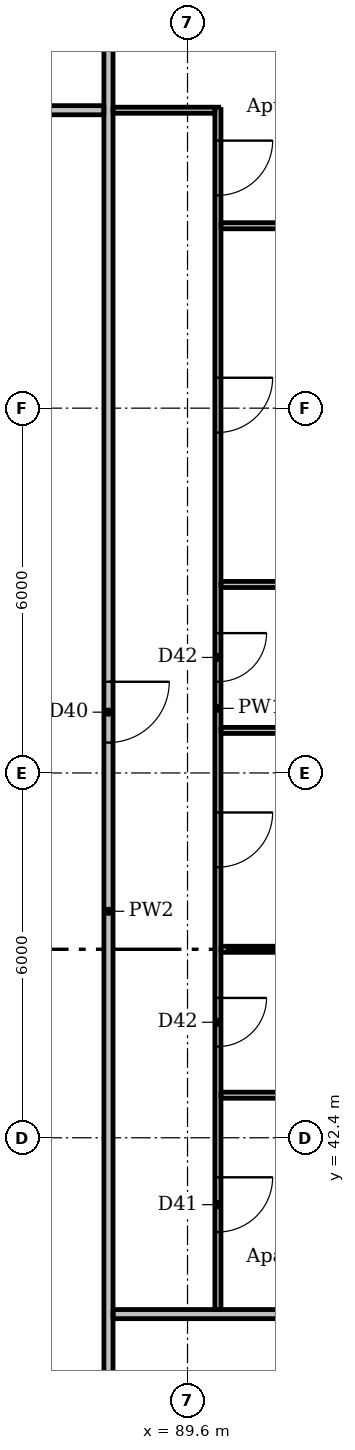
"""IFC4 building model, lengths in metres.
Left out: names, types, materials, properties, quantities, classifications, styles, units other than length and angle.
Written with IfcOpenShell. Run it as: python <this file> out.ifc"""

import sys

from ifc_helpers import new_model, si_unit, direction, frame, frame_2d, origin, place, context, subcontext, project, spatial, rectangle, extrude, element, fill, save


model = new_model("IFC4")
c1 = context("Model", 3, precision=1e-05, world=origin(), true_north=direction((0.0, 1.0)))
c2 = subcontext(c1, "Body", "Model", "MODEL_VIEW")
j1 = project(units=[si_unit("LENGTHUNIT", "METRE"), si_unit("PLANEANGLEUNIT", "RADIAN")], contexts=[c1])
p1 = place(None, origin())
s1 = spatial("IfcSite", under=j1, at=p1, CompositionType="ELEMENT")
p2 = place(p1, origin())
s2 = spatial("IfcBuilding", under=s1, at=p2, CompositionType="ELEMENT")
p3 = place(p2, frame((0.0, 0.0, 46.6)))
s3 = spatial("IfcBuildingStorey", under=s2, at=p3, CompositionType="ELEMENT", Elevation=46.6)
p4 = place(p3, frame((90.1, 59.35, 0.0), z_axis=(0.0, 0.0, 1.0), x_axis=(0.0, -1.0, 0.0)))
e1 = element("IfcWall", 1, at=p4, inside=s3, PredefinedType="PARTITIONING", context=c2, shape_type="SweptSolid", body=[
    extrude(rectangle(XDim=19.775, YDim=0.1, at=frame_2d((9.888, 0.0))), origin(), (0.0, 0.0, 1.0), 3.05),
])
p5 = place(p4, frame((4.45, 0.0, 0.0)))
e2 = element("IfcOpeningElement", 2, at=p5, cuts=e1, PredefinedType="OPENING", context=c2, shape_type="SweptSolid", body=[
    extrude(rectangle(XDim=0.9, YDim=2.1, at=frame_2d((0.45, 1.05))), frame((0.0, 0.06, 0.0), z_axis=(0.0, -1.0, 0.0), x_axis=(1.0, 0.0, 0.0)), (0.0, 0.0, 1.0), 0.12),
])
p6 = place(p4, frame((0.55, 0.0, 0.0)))
e3 = element("IfcOpeningElement", 3, at=p6, cuts=e1, PredefinedType="OPENING", context=c2, shape_type="SweptSolid", body=[
    extrude(rectangle(XDim=0.9, YDim=2.1, at=frame_2d((0.45, 1.05))), frame((0.0, 0.06, 0.0), z_axis=(0.0, -1.0, 0.0), x_axis=(1.0, 0.0, 0.0)), (0.0, 0.0, 1.0), 0.12),
])
p7 = place(p4, frame((17.6, 0.0, 0.0)))
e4 = element("IfcOpeningElement", 4, at=p7, cuts=e1, PredefinedType="OPENING", context=c2, shape_type="SweptSolid", body=[
    extrude(rectangle(XDim=0.9, YDim=2.1, at=frame_2d((0.45, 1.05))), frame((0.0, 0.06, 0.0), z_axis=(0.0, -1.0, 0.0), x_axis=(1.0, 0.0, 0.0)), (0.0, 0.0, 1.0), 0.12),
])
p8 = place(p4, frame((11.6, 0.0, 0.0)))
e5 = element("IfcOpeningElement", 5, at=p8, cuts=e1, PredefinedType="OPENING", context=c2, shape_type="SweptSolid", body=[
    extrude(rectangle(XDim=0.9, YDim=2.1, at=frame_2d((0.45, 1.05))), frame((0.0, 0.06, 0.0), z_axis=(0.0, -1.0, 0.0), x_axis=(1.0, 0.0, 0.0)), (0.0, 0.0, 1.0), 0.12),
])
p9 = place(p4, frame((14.65, 0.0, 0.0)))
e6 = element("IfcOpeningElement", 6, at=p9, cuts=e1, PredefinedType="OPENING", context=c2, shape_type="SweptSolid", body=[
    extrude(rectangle(XDim=0.8, YDim=2.1, at=frame_2d((0.4, 1.05))), frame((0.0, 0.06, 0.0), z_axis=(0.0, -1.0, 0.0), x_axis=(1.0, 0.0, 0.0)), (0.0, 0.0, 1.0), 0.12),
])
p10 = place(p4, frame((8.65, 0.0, 0.0)))
e7 = element("IfcOpeningElement", 7, at=p10, cuts=e1, PredefinedType="OPENING", context=c2, shape_type="SweptSolid", body=[
    extrude(rectangle(XDim=0.8, YDim=2.1, at=frame_2d((0.4, 1.05))), frame((0.0, 0.06, 0.0), z_axis=(0.0, -1.0, 0.0), x_axis=(1.0, 0.0, 0.0)), (0.0, 0.0, 1.0), 0.12),
])
p11 = place(p3, frame((88.375, 59.3, 0.0), z_axis=(0.0, 0.0, 1.0), x_axis=(1.0, 0.0, 0.0)))
e8 = element("IfcWall", 8, at=p11, inside=s3, PredefinedType="PARTITIONING", context=c2, shape_type="SweptSolid", body=[
    extrude(rectangle(XDim=1.675, YDim=0.1, at=frame_2d((0.837, 0.0))), origin(), (0.0, 0.0, 1.0), 3.05),
])
p12 = place(p3, frame((90.15, 57.4, 0.0), z_axis=(0.0, 0.0, 1.0), x_axis=(1.0, 0.0, 0.0)))
e9 = element("IfcWall", 9, at=p12, inside=s3, PredefinedType="PARTITIONING", context=c2, shape_type="SweptSolid", body=[
    extrude(rectangle(XDim=2.7, YDim=0.1, at=frame_2d((1.35, 0.0))), origin(), (0.0, 0.0, 1.0), 3.05),
])
p13 = place(p3, frame((90.15, 51.5, 0.0), z_axis=(0.0, 0.0, 1.0), x_axis=(1.0, 0.0, 0.0)))
e10 = element("IfcWall", 10, at=p13, inside=s3, PredefinedType="PARTITIONING", context=c2, shape_type="SweptSolid", body=[
    extrude(rectangle(XDim=8.35, YDim=0.1, at=frame_2d((4.175, 0.0))), origin(), (0.0, 0.0, 1.0), 3.05),
])
p14 = place(p3, frame((90.15, 49.1, 0.0), z_axis=(0.0, 0.0, 1.0), x_axis=(1.0, 0.0, 0.0)))
e11 = element("IfcWall", 11, at=p14, inside=s3, PredefinedType="PARTITIONING", context=c2, shape_type="SweptSolid", body=[
    extrude(rectangle(XDim=2.7, YDim=0.1, at=frame_2d((1.35, 0.0))), origin(), (0.0, 0.0, 1.0), 3.05),
])
p15 = place(p3, frame((90.15, 45.5, 0.0), z_axis=(0.0, 0.0, 1.0), x_axis=(1.0, 0.0, 0.0)))
e12 = element("IfcWall", 12, at=p15, inside=s3, PredefinedType="PARTITIONING", context=c2, shape_type="SweptSolid", body=[
    extrude(rectangle(XDim=8.35, YDim=0.1, at=frame_2d((4.175, 0.0))), origin(), (0.0, 0.0, 1.0), 3.05),
])
p16 = place(p3, frame((90.15, 43.1, 0.0), z_axis=(0.0, 0.0, 1.0), x_axis=(1.0, 0.0, 0.0)))
e13 = element("IfcWall", 13, at=p16, inside=s3, PredefinedType="PARTITIONING", context=c2, shape_type="SweptSolid", body=[
    extrude(rectangle(XDim=2.7, YDim=0.1, at=frame_2d((1.35, 0.0))), origin(), (0.0, 0.0, 1.0), 3.05),
])
p17 = place(p3, frame((88.3, 60.475, 0.0), z_axis=(0.0, 0.0, 1.0), x_axis=(0.0, -1.0, 0.0)))
e14 = element("IfcWall", 14, at=p17, inside=s3, PredefinedType="PARTITIONING", context=c2, shape_type="SweptSolid", body=[
    extrude(rectangle(XDim=28.7, YDim=0.15, at=frame_2d((14.35, 0.0))), origin(), (0.0, 0.0, 1.0), 3.05),
])
p18 = place(p17, frame((27.425, 0.0, 0.0)))
e15 = element("IfcOpeningElement", 15, at=p18, cuts=e14, PredefinedType="OPENING", context=c2, shape_type="SweptSolid", body=[
    extrude(rectangle(XDim=1.0, YDim=2.1, at=frame_2d((0.5, 1.05))), frame((0.0, 0.085, 0.0), z_axis=(0.0, -1.0, 0.0), x_axis=(1.0, 0.0, 0.0)), (0.0, 0.0, 1.0), 0.17),
])
p19 = place(p17, frame((10.575, 0.0, 0.0)))
e16 = element("IfcOpeningElement", 16, at=p19, cuts=e14, PredefinedType="OPENING", context=c2, shape_type="SweptSolid", body=[
    extrude(rectangle(XDim=1.0, YDim=2.1, at=frame_2d((0.5, 1.05))), frame((0.0, 0.085, 0.0), z_axis=(0.0, -1.0, 0.0), x_axis=(1.0, 0.0, 0.0)), (0.0, 0.0, 1.0), 0.17),
])
p20 = place(p3, frame((59.675, 59.3, 0.0), z_axis=(0.0, 0.0, 1.0), x_axis=(1.0, 0.0, 0.0)))
e17 = element("IfcWall", 17, at=p20, inside=s3, PredefinedType="PARTITIONING", context=c2, shape_type="SweptSolid", body=[
    extrude(rectangle(XDim=28.55, YDim=0.15, at=frame_2d((14.275, 0.0))), origin(), (0.0, 0.0, 1.0), 3.05),
])
p21 = place(p20, frame((8.975, 0.0, 0.0)))
e18 = element("IfcOpeningElement", 18, at=p21, cuts=e17, PredefinedType="OPENING", context=c2, shape_type="SweptSolid", body=[
    extrude(rectangle(XDim=1.0, YDim=2.1, at=frame_2d((0.5, 1.05))), frame((0.0, 0.085, 0.0), z_axis=(0.0, -1.0, 0.0), x_axis=(1.0, 0.0, 0.0)), (0.0, 0.0, 1.0), 0.17),
])
p22 = place(p20, frame((25.775, 0.0, 0.0)))
e19 = element("IfcOpeningElement", 19, at=p22, cuts=e17, PredefinedType="OPENING", context=c2, shape_type="SweptSolid", body=[
    extrude(rectangle(XDim=1.0, YDim=2.1, at=frame_2d((0.5, 1.05))), frame((0.0, 0.085, 0.0), z_axis=(0.0, -1.0, 0.0), x_axis=(1.0, 0.0, 0.0)), (0.0, 0.0, 1.0), 0.17),
])
p23 = place(p3, frame((88.375, 39.5, 0.0), z_axis=(0.0, 0.0, 1.0), x_axis=(1.0, 0.0, 0.0)))
e20 = element("IfcWall", 20, at=p23, inside=s3, PredefinedType="PARTITIONING", context=c2, shape_type="SweptSolid", body=[
    extrude(rectangle(XDim=7.125, YDim=0.15, at=frame_2d((3.562, 0.0))), origin(), (0.0, 0.0, 1.0), 3.05),
])
p24 = place(p19, origin())
e21 = element("IfcDoor", 21, at=p24, inside=s3, OperationType="SINGLE_SWING_LEFT", PredefinedType="DOOR", context=c2, shape_type="SweptSolid", body=[
    extrude(rectangle(XDim=1.0, YDim=2.1, at=frame_2d((0.5, 1.05))), frame((0.0, 0.025, 0.0), z_axis=(0.0, -1.0, 0.0), x_axis=(1.0, 0.0, 0.0)), (0.0, 0.0, 1.0), 0.05),
])
fill(e16, e21)
p25 = place(p5, origin())
e22 = element("IfcDoor", 22, at=p25, inside=s3, OperationType="SINGLE_SWING_LEFT", PredefinedType="DOOR", context=c2, shape_type="SweptSolid", body=[
    extrude(rectangle(XDim=0.9, YDim=2.1, at=frame_2d((0.45, 1.05))), frame((0.0, 0.025, 0.0), z_axis=(0.0, -1.0, 0.0), x_axis=(1.0, 0.0, 0.0)), (0.0, 0.0, 1.0), 0.05),
])
fill(e2, e22)
p26 = place(p6, origin())
e23 = element("IfcDoor", 23, at=p26, inside=s3, OperationType="SINGLE_SWING_LEFT", PredefinedType="DOOR", context=c2, shape_type="SweptSolid", body=[
    extrude(rectangle(XDim=0.9, YDim=2.1, at=frame_2d((0.45, 1.05))), frame((0.0, 0.025, 0.0), z_axis=(0.0, -1.0, 0.0), x_axis=(1.0, 0.0, 0.0)), (0.0, 0.0, 1.0), 0.05),
])
fill(e3, e23)
p27 = place(p7, origin())
e24 = element("IfcDoor", 24, at=p27, inside=s3, OperationType="SINGLE_SWING_LEFT", PredefinedType="DOOR", context=c2, shape_type="SweptSolid", body=[
    extrude(rectangle(XDim=0.9, YDim=2.1, at=frame_2d((0.45, 1.05))), frame((0.0, 0.025, 0.0), z_axis=(0.0, -1.0, 0.0), x_axis=(1.0, 0.0, 0.0)), (0.0, 0.0, 1.0), 0.05),
])
fill(e4, e24)
p28 = place(p8, origin())
e25 = element("IfcDoor", 25, at=p28, inside=s3, OperationType="SINGLE_SWING_LEFT", PredefinedType="DOOR", context=c2, shape_type="SweptSolid", body=[
    extrude(rectangle(XDim=0.9, YDim=2.1, at=frame_2d((0.45, 1.05))), frame((0.0, 0.025, 0.0), z_axis=(0.0, -1.0, 0.0), x_axis=(1.0, 0.0, 0.0)), (0.0, 0.0, 1.0), 0.05),
])
fill(e5, e25)
p29 = place(p9, origin())
e26 = element("IfcDoor", 26, at=p29, inside=s3, OperationType="SINGLE_SWING_LEFT", PredefinedType="DOOR", context=c2, shape_type="SweptSolid", body=[
    extrude(rectangle(XDim=0.8, YDim=2.1, at=frame_2d((0.4, 1.05))), frame((0.0, 0.025, 0.0), z_axis=(0.0, -1.0, 0.0), x_axis=(1.0, 0.0, 0.0)), (0.0, 0.0, 1.0), 0.05),
])
fill(e6, e26)
p30 = place(p10, origin())
e27 = element("IfcDoor", 27, at=p30, inside=s3, OperationType="SINGLE_SWING_LEFT", PredefinedType="DOOR", context=c2, shape_type="SweptSolid", body=[
    extrude(rectangle(XDim=0.8, YDim=2.1, at=frame_2d((0.4, 1.05))), frame((0.0, 0.025, 0.0), z_axis=(0.0, -1.0, 0.0), x_axis=(1.0, 0.0, 0.0)), (0.0, 0.0, 1.0), 0.05),
])
fill(e7, e27)
save(model, sys.argv[1])
